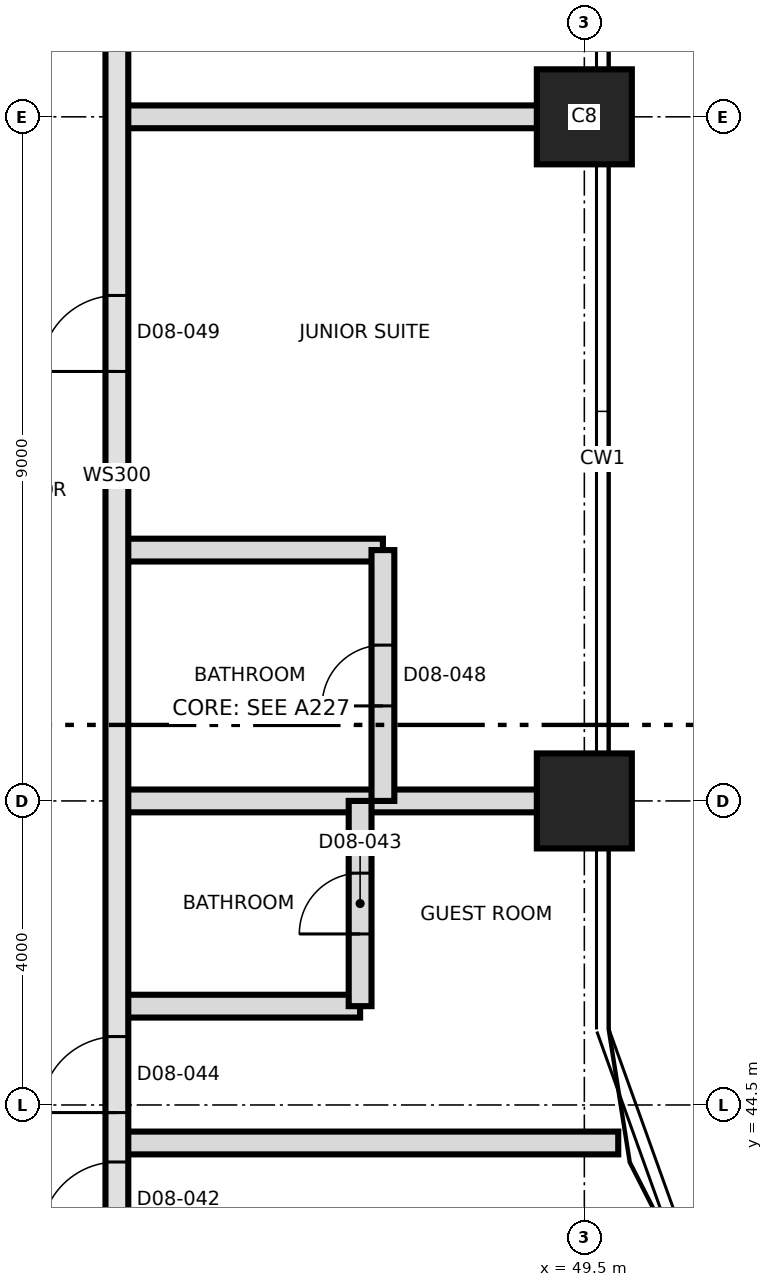
"""IFC4 building model, lengths in metres.
Left out: names, types, materials, properties, quantities, classifications, styles, units other than length and angle.
Written with IfcOpenShell. Run it as: python <this file> out.ifc"""

import sys

from ifc_helpers import new_model, si_unit, direction, frame, frame_2d, origin, origin_2d, place, context, subcontext, project, spatial, rectangle, extrude, element, fill, save


model = new_model("IFC4")
c1 = context("Model", 3, precision=1e-05, world=origin(), true_north=direction((0.0, 1.0)))
c2 = subcontext(c1, "Body", "Model", "MODEL_VIEW")
j1 = project(units=[si_unit("LENGTHUNIT", "METRE"), si_unit("PLANEANGLEUNIT", "RADIAN")], contexts=[c1])
p1 = place(None, origin())
s1 = spatial("IfcSite", under=j1, at=p1, CompositionType="ELEMENT")
p2 = place(p1, origin())
s2 = spatial("IfcBuilding", under=s1, at=p2, CompositionType="ELEMENT")
p3 = place(p2, frame((0.0, 0.0, 101.9)))
s3 = spatial("IfcBuildingStorey", under=s2, at=p3, CompositionType="ELEMENT", Elevation=101.9)
for number, where, z_axis, x_axis in (
    (1, (49.5, 48.5, 0.0), (0.0, 0.0, 1.0), (1.0, 0.0, 0.0)),
    (2, (49.5, 57.5, 0.0), (0.0, 0.0, 1.0), (1.0, 0.0, 0.0)),
):
    element("IfcColumn", number, at=place(p3, frame(where, z_axis=z_axis, x_axis=x_axis)), inside=s3, PredefinedType="COLUMN", context=c2, shape_type="SweptSolid", body=[
        extrude(rectangle(XDim=1.25, YDim=1.25, at=origin_2d()), origin(), (0.0, 0.0, 1.0), 3.7),
    ])
p4 = place(p3, frame((43.35, 44.0, 0.0), z_axis=(0.0, 0.0, 1.0), x_axis=(1.0, 0.0, 0.0)))
e3 = element("IfcWall", 3, at=p4, inside=s3, PredefinedType="PARTITIONING", context=c2, shape_type="SweptSolid", body=[
    extrude(rectangle(XDim=6.596, YDim=0.3, at=frame_2d((3.298, 0.0))), origin(), (0.0, 0.0, 1.0), 3.4),
])
p5 = place(p3, frame((43.35, 45.8, 0.0), z_axis=(0.0, 0.0, 1.0), x_axis=(1.0, 0.0, 0.0)))
e4 = element("IfcWall", 4, at=p5, inside=s3, PredefinedType="PARTITIONING", context=c2, shape_type="SweptSolid", body=[
    extrude(rectangle(XDim=3.2, YDim=0.3, at=frame_2d((1.6, 0.0))), origin(), (0.0, 0.0, 1.0), 3.4),
])
p6 = place(p3, frame((43.35, 48.5, 0.0), z_axis=(0.0, 0.0, 1.0), x_axis=(1.0, 0.0, 0.0)))
e5 = element("IfcWall", 5, at=p6, inside=s3, PredefinedType="PARTITIONING", context=c2, shape_type="SweptSolid", body=[
    extrude(rectangle(XDim=6.12, YDim=0.3, at=frame_2d((3.06, 0.0))), origin(), (0.0, 0.0, 1.0), 3.4),
])
p7 = place(p3, frame((43.35, 51.8, 0.0), z_axis=(0.0, 0.0, 1.0), x_axis=(1.0, 0.0, 0.0)))
e6 = element("IfcWall", 6, at=p7, inside=s3, PredefinedType="PARTITIONING", context=c2, shape_type="SweptSolid", body=[
    extrude(rectangle(XDim=3.5, YDim=0.3, at=frame_2d((1.75, 0.0))), origin(), (0.0, 0.0, 1.0), 3.4),
])
p8 = place(p3, frame((43.35, 57.5, 0.0), z_axis=(0.0, 0.0, 1.0), x_axis=(1.0, 0.0, 0.0)))
e7 = element("IfcWall", 7, at=p8, inside=s3, PredefinedType="PARTITIONING", context=c2, shape_type="SweptSolid", body=[
    extrude(rectangle(XDim=6.12, YDim=0.3, at=frame_2d((3.06, 0.0))), origin(), (0.0, 0.0, 1.0), 3.4),
])
p9 = place(p3, frame((43.35, 39.8, 0.0), z_axis=(0.0, 0.0, 1.0), x_axis=(0.0, 1.0, 0.0)))
e8 = element("IfcWall", 8, at=p9, inside=s3, PredefinedType="SOLIDWALL", context=c2, shape_type="SweptSolid", body=[
    extrude(rectangle(XDim=25.95, YDim=0.3, at=frame_2d((12.975, 0.0))), origin(), (0.0, 0.0, 1.0), 3.4),
])
p10 = place(p9, frame((2.95, 0.0, 0.0)))
e9 = element("IfcOpeningElement", 9, at=p10, cuts=e8, PredefinedType="OPENING", context=c2, shape_type="SweptSolid", body=[
    extrude(rectangle(XDim=1.0, YDim=2.1, at=frame_2d((0.5, 1.05))), frame((0.0, 0.16, 0.0), z_axis=(0.0, -1.0, 0.0), x_axis=(1.0, 0.0, 0.0)), (0.0, 0.0, 1.0), 0.32),
])
p11 = place(p9, frame((4.6, 0.0, 0.0)))
e10 = element("IfcOpeningElement", 10, at=p11, cuts=e8, PredefinedType="OPENING", context=c2, shape_type="SweptSolid", body=[
    extrude(rectangle(XDim=1.0, YDim=2.1, at=frame_2d((0.5, 1.05))), frame((0.0, 0.16, 0.0), z_axis=(0.0, -1.0, 0.0), x_axis=(1.0, 0.0, 0.0)), (0.0, 0.0, 1.0), 0.32),
])
p12 = place(p9, frame((14.35, 0.0, 0.0)))
e11 = element("IfcOpeningElement", 11, at=p12, cuts=e8, PredefinedType="OPENING", context=c2, shape_type="SweptSolid", body=[
    extrude(rectangle(XDim=1.0, YDim=2.4, at=frame_2d((0.5, 1.2))), frame((0.0, 0.16, 0.0), z_axis=(0.0, -1.0, 0.0), x_axis=(1.0, 0.0, 0.0)), (0.0, 0.0, 1.0), 0.32),
])
p13 = place(p9, frame((19.7, 0.0, 0.0)))
e12 = element("IfcOpeningElement", 12, at=p13, cuts=e8, PredefinedType="OPENING", context=c2, shape_type="SweptSolid", body=[
    extrude(rectangle(XDim=1.0, YDim=2.4, at=frame_2d((0.5, 1.2))), frame((0.0, 0.16, 0.0), z_axis=(0.0, -1.0, 0.0), x_axis=(1.0, 0.0, 0.0)), (0.0, 0.0, 1.0), 0.32),
])
p14 = place(p3, frame((46.55, 45.8, 0.0), z_axis=(0.0, 0.0, 1.0), x_axis=(0.0, 1.0, 0.0)))
e13 = element("IfcWall", 13, at=p14, inside=s3, PredefinedType="PARTITIONING", context=c2, shape_type="SweptSolid", body=[
    extrude(rectangle(XDim=2.7, YDim=0.3, at=frame_2d((1.35, 0.0))), origin(), (0.0, 0.0, 1.0), 3.4),
])
p15 = place(p14, frame((0.95, 0.0, 0.0)))
e14 = element("IfcOpeningElement", 14, at=p15, cuts=e13, PredefinedType="OPENING", context=c2, shape_type="SweptSolid", body=[
    extrude(rectangle(XDim=0.8, YDim=2.1, at=frame_2d((0.4, 1.05))), frame((0.0, 0.16, 0.0), z_axis=(0.0, -1.0, 0.0), x_axis=(1.0, 0.0, 0.0)), (0.0, 0.0, 1.0), 0.32),
])
p16 = place(p3, frame((46.85, 48.5, 0.0), z_axis=(0.0, 0.0, 1.0), x_axis=(0.0, 1.0, 0.0)))
e15 = element("IfcWall", 15, at=p16, inside=s3, PredefinedType="PARTITIONING", context=c2, shape_type="SweptSolid", body=[
    extrude(rectangle(XDim=3.3, YDim=0.3, at=frame_2d((1.65, 0.0))), origin(), (0.0, 0.0, 1.0), 3.4),
])
p17 = place(p16, frame((1.25, 0.0, 0.0)))
e16 = element("IfcOpeningElement", 16, at=p17, cuts=e15, PredefinedType="OPENING", context=c2, shape_type="SweptSolid", body=[
    extrude(rectangle(XDim=0.8, YDim=2.1, at=frame_2d((0.4, 1.05))), frame((0.0, 0.16, 0.0), z_axis=(0.0, -1.0, 0.0), x_axis=(1.0, 0.0, 0.0)), (0.0, 0.0, 1.0), 0.32),
])
p18 = place(p10, origin())
e17 = element("IfcDoor", 17, at=p18, inside=s3, OperationType="SINGLE_SWING_LEFT", PredefinedType="DOOR", context=c2, shape_type="SweptSolid", body=[
    extrude(rectangle(XDim=1.0, YDim=2.1, at=frame_2d((0.5, 1.05))), frame((0.0, 0.025, 0.0), z_axis=(0.0, -1.0, 0.0), x_axis=(1.0, 0.0, 0.0)), (0.0, 0.0, 1.0), 0.05),
])
fill(e9, e17)
p19 = place(p15, origin())
e18 = element("IfcDoor", 18, at=p19, inside=s3, OperationType="SINGLE_SWING_LEFT", PredefinedType="DOOR", context=c2, shape_type="SweptSolid", body=[
    extrude(rectangle(XDim=0.8, YDim=2.1, at=frame_2d((0.4, 1.05))), frame((0.0, 0.025, 0.0), z_axis=(0.0, -1.0, 0.0), x_axis=(1.0, 0.0, 0.0)), (0.0, 0.0, 1.0), 0.05),
])
fill(e14, e18)
p20 = place(p11, origin())
e19 = element("IfcDoor", 19, at=p20, inside=s3, OperationType="SINGLE_SWING_LEFT", PredefinedType="DOOR", context=c2, shape_type="SweptSolid", body=[
    extrude(rectangle(XDim=1.0, YDim=2.1, at=frame_2d((0.5, 1.05))), frame((0.0, 0.025, 0.0), z_axis=(0.0, -1.0, 0.0), x_axis=(1.0, 0.0, 0.0)), (0.0, 0.0, 1.0), 0.05),
])
fill(e10, e19)
p21 = place(p17, origin())
e20 = element("IfcDoor", 20, at=p21, inside=s3, OperationType="SINGLE_SWING_LEFT", PredefinedType="DOOR", context=c2, shape_type="SweptSolid", body=[
    extrude(rectangle(XDim=0.8, YDim=2.1, at=frame_2d((0.4, 1.05))), frame((0.0, 0.025, 0.0), z_axis=(0.0, -1.0, 0.0), x_axis=(1.0, 0.0, 0.0)), (0.0, 0.0, 1.0), 0.05),
])
fill(e16, e20)
p22 = place(p12, origin())
e21 = element("IfcDoor", 21, at=p22, inside=s3, OperationType="SINGLE_SWING_RIGHT", PredefinedType="DOOR", context=c2, shape_type="SweptSolid", body=[
    extrude(rectangle(XDim=1.0, YDim=2.4, at=frame_2d((0.5, 1.2))), frame((0.0, 0.025, 0.0), z_axis=(0.0, -1.0, 0.0), x_axis=(1.0, 0.0, 0.0)), (0.0, 0.0, 1.0), 0.05),
])
fill(e11, e21)
save(model, sys.argv[1])
